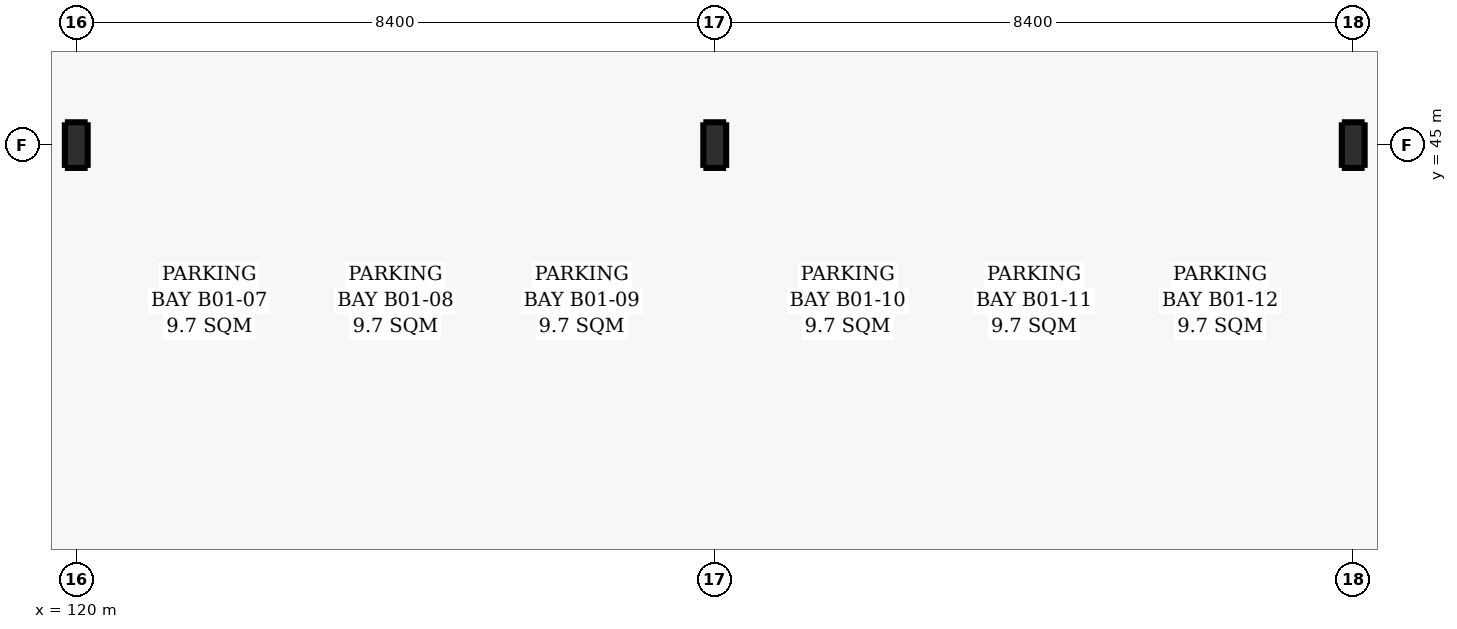
"""IFC4 building model, lengths in metres.
Left out: names, types, materials, properties, quantities, classifications, styles, units other than length and angle.
Written with IfcOpenShell. Run it as: python <this file> out.ifc"""

import sys

from ifc_helpers import new_model, si_unit, direction, frame, origin, origin_2d, place, context, subcontext, project, spatial, i_section, extrude, element, save


model = new_model("IFC4")
c1 = context("Model", 3, precision=1e-05, world=origin(), true_north=direction((0.0, 1.0)))
c2 = subcontext(c1, "Body", "Model", "MODEL_VIEW")
j1 = project(units=[si_unit("LENGTHUNIT", "METRE"), si_unit("PLANEANGLEUNIT", "RADIAN")], contexts=[c1])
p1 = place(None, origin())
s1 = spatial("IfcSite", under=j1, at=p1, CompositionType="ELEMENT")
p2 = place(p1, origin())
s2 = spatial("IfcBuilding", under=s1, at=p2, CompositionType="ELEMENT")
p3 = place(p2, frame((0.0, 0.0, -4.8)))
s3 = spatial("IfcBuildingStorey", under=s2, at=p3, CompositionType="ELEMENT", Elevation=-4.8)
for number, where, z_axis, x_axis in (
    (1, (120.0, 45.0, 0.0), (0.0, 0.0, 1.0), (1.0, 0.0, 0.0)),
    (2, (128.4, 45.0, 0.0), (0.0, 0.0, 1.0), (1.0, 0.0, 0.0)),
    (3, (136.8, 45.0, 0.0), (0.0, 0.0, 1.0), (1.0, 0.0, 0.0)),
):
    element("IfcColumn", number, at=place(p3, frame(where, z_axis=z_axis, x_axis=x_axis)), inside=s3, PredefinedType="COLUMN", context=c2, shape_type="SweptSolid", body=[
        extrude(i_section(OverallWidth=0.3, OverallDepth=0.6, WebThickness=0.015, FlangeThickness=0.03, FilletRadius=0.027, at=origin_2d()), origin(), (0.0, 0.0, 1.0), 4.8),
    ])
save(model, sys.argv[1])
